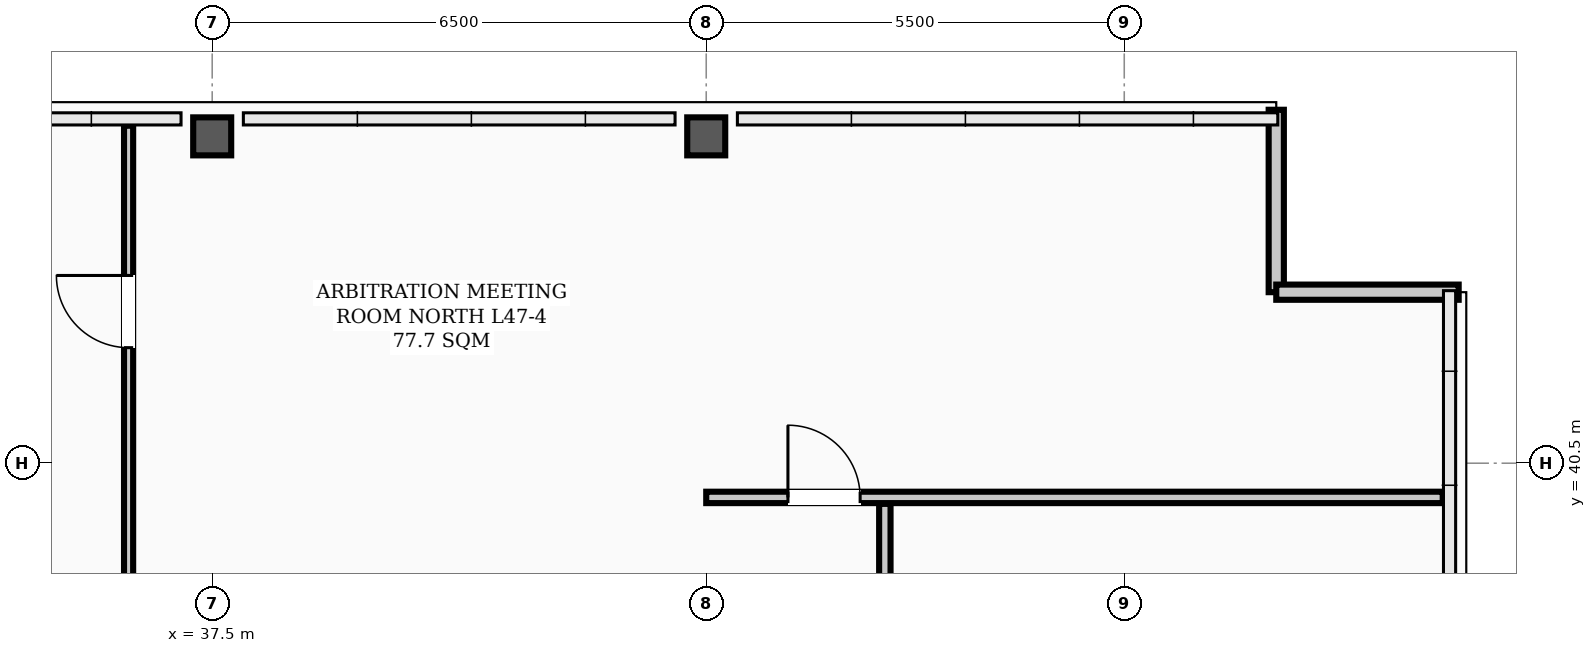
"""IFC4 building model, lengths in metres.
Left out: names, types, materials, properties, quantities, classifications, styles, units other than length and angle.
Written with IfcOpenShell. Run it as: python <this file> out.ifc"""

import sys

from ifc_helpers import new_model, si_unit, direction, frame, frame_2d, origin, origin_2d, place, context, subcontext, project, spatial, rectangle, hollow_rectangle, extrude, element, fill, save


model = new_model("IFC4")
c1 = context("Model", 3, precision=1e-05, world=origin(), true_north=direction((0.0, 1.0)))
c2 = subcontext(c1, "Body", "Model", "MODEL_VIEW")
j1 = project(units=[si_unit("LENGTHUNIT", "METRE"), si_unit("PLANEANGLEUNIT", "RADIAN")], contexts=[c1])
p1 = place(None, origin())
s1 = spatial("IfcSite", under=j1, at=p1, CompositionType="ELEMENT")
p2 = place(p1, origin())
s2 = spatial("IfcBuilding", under=s1, at=p2, CompositionType="ELEMENT")
p3 = place(p2, frame((0.0, 0.0, 189.0)))
s3 = spatial("IfcBuildingStorey", under=s2, at=p3, CompositionType="ELEMENT", Elevation=189.0)
for number, where, z_axis, x_axis in (
    (1, (37.5, 44.8, 0.0), (0.0, 0.0, 1.0), (1.0, 0.0, 0.0)),
    (2, (44.0, 44.8, 0.0), (0.0, 0.0, 1.0), (1.0, 0.0, 0.0)),
):
    element("IfcColumn", number, at=place(p3, frame(where, z_axis=z_axis, x_axis=x_axis)), inside=s3, PredefinedType="COLUMN", context=c2, shape_type="SweptSolid", body=[
        extrude(hollow_rectangle(XDim=0.5, YDim=0.5, WallThickness=0.024, InnerFilletRadius=0.012, OuterFilletRadius=0.036, at=origin_2d()), origin(), (0.0, 0.0, 1.0), 3.9),
    ])
for number, where, z_axis, x_axis in (
    (3, (51.5, 45.15, 0.0), (0.0, 0.0, 1.0), (0.0, -1.0, 0.0)),
    (4, (51.5, 42.75, 0.0), (0.0, 0.0, 1.0), (1.0, 0.0, 0.0)),
):
    element("IfcWall", number, at=place(p3, frame(where, z_axis=z_axis, x_axis=x_axis)), inside=s3, PredefinedType="PARAPET", context=c2, shape_type="SweptSolid", body=[
        extrude(rectangle(XDim=2.4, YDim=0.2, at=frame_2d((1.2, 0.0))), origin(), (0.0, 0.0, 1.0), 1.2),
    ])
p4 = place(p3, frame((44.0, 40.05, 0.0), z_axis=(0.0, 0.0, 1.0), x_axis=(1.0, 0.0, 0.0)))
e5 = element("IfcWall", 5, at=p4, inside=s3, PredefinedType="PARTITIONING", context=c2, shape_type="SweptSolid", body=[
    extrude(rectangle(XDim=9.69, YDim=0.15, at=frame_2d((4.845, 0.0))), origin(), (0.0, 0.0, 1.0), 3.2),
])
p5 = place(p4, frame((1.075, 0.0, 0.0)))
e6 = element("IfcOpeningElement", 6, at=p5, cuts=e5, PredefinedType="OPENING", context=c2, shape_type="SweptSolid", body=[
    extrude(rectangle(XDim=0.95, YDim=2.08, at=frame_2d((0.475, 1.04))), frame((0.0, 0.085, 0.0), z_axis=(0.0, -1.0, 0.0), x_axis=(1.0, 0.0, 0.0)), (0.0, 0.0, 1.0), 0.17),
])
p6 = place(p3, frame((46.35, 26.385, 0.0), z_axis=(0.0, 0.0, 1.0), x_axis=(0.0, 1.0, 0.0)))
e7 = element("IfcWall", 7, at=p6, inside=s3, PredefinedType="PARTITIONING", context=c2, shape_type="SweptSolid", body=[
    extrude(rectangle(XDim=13.58, YDim=0.15, at=frame_2d((6.79, 0.0))), origin(), (0.0, 0.0, 1.0), 3.1),
])
p7 = place(p6, frame((0.64, 0.0, 0.0)))
e8 = element("IfcOpeningElement", 8, at=p7, cuts=e7, PredefinedType="OPENING", context=c2, shape_type="SweptSolid", body=[
    extrude(rectangle(XDim=0.95, YDim=2.08, at=frame_2d((0.475, 1.04))), frame((0.0, 0.085, 0.0), z_axis=(0.0, -1.0, 0.0), x_axis=(1.0, 0.0, 0.0)), (0.0, 0.0, 1.0), 0.17),
])
p8 = place(p6, frame((9.665, 0.0, 0.0)))
e9 = element("IfcOpeningElement", 9, at=p8, cuts=e7, PredefinedType="OPENING", context=c2, shape_type="SweptSolid", body=[
    extrude(rectangle(XDim=0.95, YDim=2.08, at=frame_2d((0.475, 1.04))), frame((0.0, 0.085, 0.0), z_axis=(0.0, -1.0, 0.0), x_axis=(1.0, 0.0, 0.0)), (0.0, 0.0, 1.0), 0.17),
])
p9 = place(p3, frame((36.4, 38.535, 0.0), z_axis=(0.0, 0.0, 1.0), x_axis=(0.0, 1.0, 0.0)))
e10 = element("IfcWall", 10, at=p9, inside=s3, PredefinedType="PARTITIONING", context=c2, shape_type="SweptSolid", body=[
    extrude(rectangle(XDim=6.405, YDim=0.12, at=frame_2d((3.203, 0.0))), origin(), (0.0, 0.0, 1.0), 3.212),
])
p10 = place(p9, frame((3.485, 0.0, 0.0)))
e11 = element("IfcOpeningElement", 11, at=p10, cuts=e10, PredefinedType="OPENING", context=c2, shape_type="SweptSolid", body=[
    extrude(rectangle(XDim=0.95, YDim=2.08, at=frame_2d((0.475, 1.04))), frame((0.0, 0.07, 0.0), z_axis=(0.0, -1.0, 0.0), x_axis=(1.0, 0.0, 0.0)), (0.0, 0.0, 1.0), 0.14),
])
p11 = place(p5, origin())
e12 = element("IfcDoor", 12, at=p11, inside=s3, OperationType="SINGLE_SWING_LEFT", PredefinedType="DOOR", context=c2, shape_type="SweptSolid", body=[
    extrude(rectangle(XDim=0.95, YDim=2.08, at=frame_2d((0.475, 1.04))), frame((0.0, 0.025, 0.0), z_axis=(0.0, -1.0, 0.0), x_axis=(1.0, 0.0, 0.0)), (0.0, 0.0, 1.0), 0.05),
])
fill(e6, e12)
p12 = place(p10, origin())
e13 = element("IfcDoor", 13, at=p12, inside=s3, OperationType="SINGLE_SWING_RIGHT", PredefinedType="DOOR", context=c2, shape_type="SweptSolid", body=[
    extrude(rectangle(XDim=0.95, YDim=2.08, at=frame_2d((0.475, 1.04))), frame((0.0, 0.025, 0.0), z_axis=(0.0, -1.0, 0.0), x_axis=(1.0, 0.0, 0.0)), (0.0, 0.0, 1.0), 0.05),
])
fill(e11, e13)
save(model, sys.argv[1])
